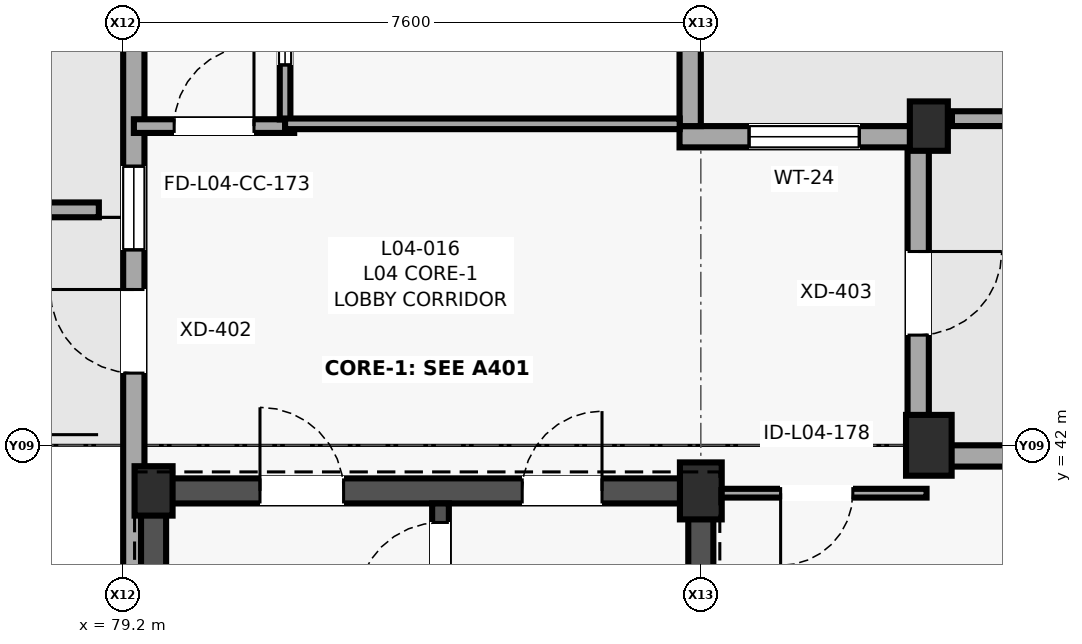
"""IFC4 building model, lengths in metres.
Left out: names, types, materials, properties, quantities, classifications, styles, units other than length and angle.
Written with IfcOpenShell. Run it as: python <this file> out.ifc"""

import sys

from ifc_helpers import new_model, si_unit, direction, frame, frame_2d, origin, origin_2d, place, context, subcontext, project, spatial, polyline, rectangle, outline, extrude, element, fill, save


model = new_model("IFC4")
c1 = context("Model", 3, precision=1e-05, world=origin(), true_north=direction((0.0, 1.0)))
c2 = subcontext(c1, "Body", "Model", "MODEL_VIEW")
j1 = project(units=[si_unit("LENGTHUNIT", "METRE"), si_unit("PLANEANGLEUNIT", "RADIAN")], contexts=[c1])
p1 = place(None, origin())
s1 = spatial("IfcSite", under=j1, at=p1, CompositionType="ELEMENT")
p2 = place(p1, origin())
s2 = spatial("IfcBuilding", under=s1, at=p2, CompositionType="ELEMENT")
p3 = place(p2, frame((0.0, 0.0, 16.2)))
s3 = spatial("IfcBuildingStorey", under=s2, at=p3, CompositionType="ELEMENT", Elevation=16.2)
p4 = place(p3, frame((79.6, 41.4, 0.0), z_axis=(0.0, 0.0, 1.0), x_axis=(1.0, 0.0, 0.0)))
e1 = element("IfcColumn", 1, at=p4, inside=s3, PredefinedType="COLUMN", context=c2, shape_type="SweptSolid", body=[
    extrude(rectangle(XDim=0.5, YDim=0.65, at=origin_2d()), origin(), (0.0, 0.0, 1.0), 4.0),
])
p5 = place(p3, frame((86.8, 41.4, 0.0), z_axis=(0.0, 0.0, 1.0), x_axis=(1.0, 0.0, 0.0)))
e2 = element("IfcColumn", 2, at=p5, inside=s3, PredefinedType="COLUMN", context=c2, shape_type="SweptSolid", body=[
    extrude(rectangle(XDim=0.55, YDim=0.75, at=origin_2d()), origin(), (0.0, 0.0, 1.0), 4.0),
])
p6 = place(p3, frame((89.8, 42.0, 0.0), z_axis=(0.0, 0.0, 1.0), x_axis=(1.0, 0.0, 0.0)))
e3 = element("IfcColumn", 3, at=p6, inside=s3, PredefinedType="COLUMN", context=c2, shape_type="SweptSolid", body=[
    extrude(rectangle(XDim=0.6, YDim=0.8, at=origin_2d()), origin(), (0.0, 0.0, 1.0), 4.0),
])
p7 = place(p3, frame((89.8, 46.2, 0.0), z_axis=(0.0, 0.0, 1.0), x_axis=(1.0, 0.0, 0.0)))
e4 = element("IfcColumn", 4, at=p7, inside=s3, PredefinedType="COLUMN", context=c2, shape_type="SweptSolid", body=[
    extrude(rectangle(XDim=0.5, YDim=0.65, at=origin_2d()), origin(), (0.0, 0.0, 1.0), 4.0),
])
p8 = place(p3, frame((94.0, 41.86, 0.0), z_axis=(0.0, 0.0, 1.0), x_axis=(-1.0, 0.0, 0.0)))
e5 = element("IfcWall", 5, at=p8, inside=s3, PredefinedType="SOLIDWALL", context=c2, shape_type="SweptSolid", body=[
    extrude(rectangle(XDim=4.48, YDim=0.28, at=frame_2d((2.24, 0.0))), origin(), (0.0, 0.0, 1.0), 3.305),
])
p9 = place(p8, frame((1.265, 0.0, 1.05)))
e6 = element("IfcOpeningElement", 6, at=p9, cuts=e5, PredefinedType="OPENING", context=c2, shape_type="SweptSolid", body=[
    extrude(rectangle(XDim=1.95, YDim=1.5, at=frame_2d((0.975, 0.75))), frame((0.0, 0.15, 0.0), z_axis=(0.0, -1.0, 0.0), x_axis=(1.0, 0.0, 0.0)), (0.0, 0.0, 1.0), 0.3),
])
p10 = place(p3, frame((89.66, 42.0, 0.0), z_axis=(0.0, 0.0, 1.0), x_axis=(0.0, 1.0, 0.0)))
e7 = element("IfcWall", 7, at=p10, inside=s3, PredefinedType="SOLIDWALL", context=c2, shape_type="SweptSolid", body=[
    extrude(rectangle(XDim=3.92, YDim=0.28, at=frame_2d((1.96, 0.0))), origin(), (0.0, 0.0, 1.0), 3.275),
])
p11 = place(p10, frame((1.45, 0.0, 0.0)))
e8 = element("IfcOpeningElement", 8, at=p11, cuts=e7, PredefinedType="OPENING", context=c2, shape_type="SweptSolid", body=[
    extrude(rectangle(XDim=1.1, YDim=2.15, at=frame_2d((0.55, 1.075))), frame((0.0, 0.15, 0.0), z_axis=(0.0, -1.0, 0.0), x_axis=(1.0, 0.0, 0.0)), (0.0, 0.0, 1.0), 0.3),
])
p12 = place(p3, frame((89.8, 46.06, 0.0), z_axis=(0.0, 0.0, 1.0), x_axis=(-1.0, 0.0, 0.0)))
e9 = element("IfcWall", 9, at=p12, inside=s3, PredefinedType="SOLIDWALL", context=c2, shape_type="SweptSolid", body=[
    extrude(rectangle(XDim=3.28, YDim=0.28, at=frame_2d((1.64, 0.0))), origin(), (0.0, 0.0, 1.0), 3.78),
])
p13 = place(p12, frame((0.915, 0.0, 0.85)))
e10 = element("IfcOpeningElement", 10, at=p13, cuts=e9, PredefinedType="OPENING", context=c2, shape_type="SweptSolid", body=[
    extrude(rectangle(XDim=1.45, YDim=1.7, at=frame_2d((0.725, 0.85))), frame((0.0, 0.15, 0.0), z_axis=(0.0, -1.0, 0.0), x_axis=(1.0, 0.0, 0.0)), (0.0, 0.0, 1.0), 0.3),
])
p14 = place(p3, frame((86.66, 46.2, 0.0), z_axis=(0.0, 0.0, 1.0), x_axis=(0.0, 1.0, 0.0)))
e11 = element("IfcWall", 11, at=p14, inside=s3, PredefinedType="SOLIDWALL", context=c2, shape_type="SweptSolid", body=[
    extrude(rectangle(XDim=11.1, YDim=0.28, at=frame_2d((5.55, 0.0))), origin(), (0.0, 0.0, 1.0), 3.175),
])
p15 = place(p14, frame((1.0, 0.0, 0.85)))
e12 = element("IfcOpeningElement", 12, at=p15, cuts=e11, PredefinedType="OPENING", context=c2, shape_type="SweptSolid", body=[
    extrude(rectangle(XDim=1.7, YDim=1.75, at=frame_2d((0.85, 0.875))), frame((0.0, 0.15, 0.0), z_axis=(0.0, -1.0, 0.0), x_axis=(1.0, 0.0, 0.0)), (0.0, 0.0, 1.0), 0.3),
])
p16 = place(p14, frame((4.6, 0.0, 0.85)))
e13 = element("IfcOpeningElement", 13, at=p16, cuts=e11, PredefinedType="OPENING", context=c2, shape_type="SweptSolid", body=[
    extrude(rectangle(XDim=1.9, YDim=1.65, at=frame_2d((0.95, 0.825))), frame((0.0, 0.15, 0.0), z_axis=(0.0, -1.0, 0.0), x_axis=(1.0, 0.0, 0.0)), (0.0, 0.0, 1.0), 0.3),
])
p17 = place(p14, frame((7.775, 0.0, 1.05)))
e14 = element("IfcOpeningElement", 14, at=p17, cuts=e11, PredefinedType="OPENING", context=c2, shape_type="SweptSolid", body=[
    extrude(rectangle(XDim=2.05, YDim=1.55, at=frame_2d((1.025, 0.775))), frame((0.0, 0.15, 0.0), z_axis=(0.0, -1.0, 0.0), x_axis=(1.0, 0.0, 0.0)), (0.0, 0.0, 1.0), 0.3),
])
p18 = place(p3, frame((79.34, 50.84, 0.0), z_axis=(0.0, 0.0, 1.0), x_axis=(0.0, -1.0, 0.0)))
e15 = element("IfcWall", 15, at=p18, inside=s3, PredefinedType="SOLIDWALL", context=c2, shape_type="SweptSolid", body=[
    extrude(rectangle(XDim=17.56, YDim=0.28, at=frame_2d((8.78, 0.0))), origin(), (0.0, 0.0, 1.0), 3.175),
])
p19 = place(p18, frame((6.79, 0.0, 0.0)))
e16 = element("IfcOpeningElement", 16, at=p19, cuts=e15, PredefinedType="OPENING", context=c2, shape_type="SweptSolid", body=[
    extrude(rectangle(XDim=1.1, YDim=2.15, at=frame_2d((0.55, 1.075))), frame((0.0, 0.15, 0.0), z_axis=(0.0, -1.0, 0.0), x_axis=(1.0, 0.0, 0.0)), (0.0, 0.0, 1.0), 0.3),
])
p20 = place(p18, frame((1.881, 0.0, 0.85)))
e17 = element("IfcOpeningElement", 17, at=p20, cuts=e15, PredefinedType="OPENING", context=c2, shape_type="SweptSolid", body=[
    extrude(rectangle(XDim=1.45, YDim=1.7, at=frame_2d((0.725, 0.85))), frame((0.0, 0.15, 0.0), z_axis=(0.0, -1.0, 0.0), x_axis=(1.0, 0.0, 0.0)), (0.0, 0.0, 1.0), 0.3),
])
p21 = place(p18, frame((5.168, 0.0, 0.75)))
e18 = element("IfcOpeningElement", 18, at=p21, cuts=e15, PredefinedType="OPENING", context=c2, shape_type="SweptSolid", body=[
    extrude(rectangle(XDim=1.1, YDim=2.1, at=frame_2d((0.55, 1.05))), frame((0.0, 0.15, 0.0), z_axis=(0.0, -1.0, 0.0), x_axis=(1.0, 0.0, 0.0)), (0.0, 0.0, 1.0), 0.3),
])
p22 = place(p3, frame((51.12, 45.098, 0.0), z_axis=(0.0, 0.0, 1.0), x_axis=(1.0, 0.0, 0.0)))
e19 = element("IfcWall", 19, at=p22, inside=s3, PredefinedType="PARAPET", context=c2, shape_type="SweptSolid", body=[
    extrude(outline(polyline([(0.0, 0.0), (27.76, 0.0), (27.76, 1.12), (18.877, 1.12), (18.827, 1.46), (8.933, 1.46), (8.883, 1.12), (0.0, 1.12), (0.0, 0.0)])), frame((0.0, 0.098, 0.0), z_axis=(0.0, -1.0, 0.0), x_axis=(1.0, 0.0, 0.0)), (0.0, 0.0, 1.0), 0.195),
])
p23 = place(p3, frame((90.104, 46.298, 0.0), z_axis=(0.0, 0.0, 1.0), x_axis=(1.0, 0.0, 0.0)))
e20 = element("IfcWall", 20, at=p23, inside=s3, PredefinedType="PARAPET", context=c2, shape_type="SweptSolid", body=[
    extrude(outline(polyline([(0.0, 0.0), (17.176, 0.0), (17.176, 1.12), (11.68, 1.12), (11.63, 1.46), (5.546, 1.46), (5.496, 1.12), (0.0, 1.12), (0.0, 0.0)])), frame((0.0, 0.098, 0.0), z_axis=(0.0, -1.0, 0.0), x_axis=(1.0, 0.0, 0.0)), (0.0, 0.0, 1.0), 0.195),
])
p24 = place(p3, frame((79.435, 41.4, 0.0), z_axis=(0.0, 0.0, 1.0), x_axis=(1.0, 0.0, 0.0)))
e21 = element("IfcWall", 21, at=p24, inside=s3, PredefinedType="SHEAR", context=c2, shape_type="SweptSolid", body=[
    extrude(rectangle(XDim=7.53, YDim=0.33, at=frame_2d((3.765, 0.0))), origin(), (0.0, 0.0, 1.0), 3.78),
])
p25 = place(p24, frame((5.015, 0.0, 0.0)))
e22 = element("IfcOpeningElement", 22, at=p25, cuts=e21, PredefinedType="OPENING", context=c2, shape_type="SweptSolid", body=[
    extrude(rectangle(XDim=1.05, YDim=2.15, at=frame_2d((0.525, 1.075))), frame((0.0, 0.175, 0.0), z_axis=(0.0, -1.0, 0.0), x_axis=(1.0, 0.0, 0.0)), (0.0, 0.0, 1.0), 0.35),
])
p26 = place(p24, frame((1.565, 0.0, 0.0)))
e23 = element("IfcOpeningElement", 23, at=p26, cuts=e21, PredefinedType="OPENING", context=c2, shape_type="SweptSolid", body=[
    extrude(rectangle(XDim=1.1, YDim=2.15, at=frame_2d((0.55, 1.075))), frame((0.0, 0.175, 0.0), z_axis=(0.0, -1.0, 0.0), x_axis=(1.0, 0.0, 0.0)), (0.0, 0.0, 1.0), 0.35),
])
for number, where, z_axis, x_axis in (
    (24, (79.6, 33.765, 0.0), (0.0, 0.0, 1.0), (0.0, 1.0, 0.0)),
    (25, (86.8, 33.765, 0.0), (0.0, 0.0, 1.0), (0.0, 1.0, 0.0)),
):
    element("IfcWall", number, at=place(p3, frame(where, z_axis=z_axis, x_axis=x_axis)), inside=s3, PredefinedType="SHEAR", context=c2, shape_type="SweptSolid", body=[
        extrude(rectangle(XDim=7.47, YDim=0.33, at=frame_2d((3.735, 0.0))), origin(), (0.0, 0.0, 1.0), 3.78),
    ])
p27 = place(p3, frame((83.375, 33.765, 0.0), z_axis=(0.0, 0.0, 1.0), x_axis=(0.0, 1.0, 0.0)))
e26 = element("IfcWall", 26, at=p27, inside=s3, PredefinedType="SHEAR", context=c2, shape_type="SweptSolid", body=[
    extrude(rectangle(XDim=7.47, YDim=0.22, at=frame_2d((3.735, 0.0))), origin(), (0.0, 0.0, 1.0), 3.78),
])
p28 = place(p27, frame((6.12, 0.0, 0.0)))
e27 = element("IfcOpeningElement", 27, at=p28, cuts=e26, PredefinedType="OPENING", context=c2, shape_type="SweptSolid", body=[
    extrude(rectangle(XDim=1.1, YDim=2.15, at=frame_2d((0.55, 1.075))), frame((0.0, 0.12, 0.0), z_axis=(0.0, -1.0, 0.0), x_axis=(1.0, 0.0, 0.0)), (0.0, 0.0, 1.0), 0.24),
])
p29 = place(p3, frame((79.341, 46.2, 0.0), z_axis=(0.0, 0.0, 1.0), x_axis=(1.0, 0.0, 0.0)))
e28 = element("IfcWall", 28, at=p29, inside=s3, PredefinedType="PARTITIONING", context=c2, shape_type="SweptSolid", body=[
    extrude(rectangle(XDim=2.109, YDim=0.18, at=frame_2d((1.054, 0.0))), origin(), (0.0, 0.0, 1.0), 3.78),
])
p30 = place(p29, frame((0.53, 0.0, 0.0)))
e29 = element("IfcOpeningElement", 29, at=p30, cuts=e28, PredefinedType="OPENING", context=c2, shape_type="SweptSolid", body=[
    extrude(rectangle(XDim=1.05, YDim=2.15, at=frame_2d((0.525, 1.075))), frame((0.0, 0.1, 0.0), z_axis=(0.0, -1.0, 0.0), x_axis=(1.0, 0.0, 0.0)), (0.0, 0.0, 1.0), 0.2),
])
p31 = place(p3, frame((89.77, 41.37, 0.0), z_axis=(0.0, 0.0, 1.0), x_axis=(-1.0, 0.0, 0.0)))
e30 = element("IfcWall", 30, at=p31, inside=s3, PredefinedType="PARTITIONING", context=c2, shape_type="SweptSolid", body=[
    extrude(rectangle(XDim=2.89, YDim=0.115, at=frame_2d((1.445, 0.0))), origin(), (0.0, 0.0, 1.0), 3.755),
])
p32 = place(p31, frame((0.97, 0.0, 0.0)))
e31 = element("IfcOpeningElement", 31, at=p32, cuts=e30, PredefinedType="OPENING", context=c2, shape_type="SweptSolid", body=[
    extrude(rectangle(XDim=0.95, YDim=2.05, at=frame_2d((0.475, 1.025))), frame((0.0, 0.067, 0.0), z_axis=(0.0, -1.0, 0.0), x_axis=(1.0, 0.0, 0.0)), (0.0, 0.0, 1.0), 0.135),
])
p33 = place(p3, frame((81.33, 53.502, 0.0), z_axis=(0.0, 0.0, 1.0), x_axis=(0.0, -1.0, 0.0)))
e32 = element("IfcWall", 32, at=p33, inside=s3, PredefinedType="PARTITIONING", context=c2, shape_type="SweptSolid", body=[
    extrude(rectangle(XDim=7.214, YDim=0.14, at=frame_2d((3.607, 0.0))), origin(), (0.0, 0.0, 1.0), 3.775),
])
p34 = place(p33, frame((3.017, 0.0, 0.0)))
e33 = element("IfcOpeningElement", 33, at=p34, cuts=e32, PredefinedType="OPENING", context=c2, shape_type="SweptSolid", body=[
    extrude(rectangle(XDim=1.18, YDim=2.2, at=frame_2d((0.59, 1.1))), frame((0.0, 0.08, 0.0), z_axis=(0.0, -1.0, 0.0), x_axis=(1.0, 0.0, 0.0)), (0.0, 0.0, 1.0), 0.16),
])
p35 = place(p33, frame((4.897, 0.0, 1.05)))
e34 = element("IfcOpeningElement", 34, at=p35, cuts=e32, PredefinedType="OPENING", context=c2, shape_type="SweptSolid", body=[
    extrude(rectangle(XDim=1.6, YDim=1.1, at=frame_2d((0.8, 0.55))), frame((0.0, 0.08, 0.0), z_axis=(0.0, -1.0, 0.0), x_axis=(1.0, 0.0, 0.0)), (0.0, 0.0, 1.0), 0.16),
])
p36 = place(p3, frame((81.33, 46.23, 0.0), z_axis=(0.0, 0.0, 1.0), x_axis=(1.0, 0.0, 0.0)))
e35 = element("IfcWall", 35, at=p36, inside=s3, PredefinedType="PARTITIONING", context=c2, shape_type="SweptSolid", body=[
    extrude(rectangle(XDim=5.192, YDim=0.14, at=frame_2d((2.596, 0.0))), origin(), (0.0, 0.0, 1.0), 3.775),
])
p37 = place(p19, frame((1.1, 0.0, 0.0), z_axis=(0.0, 0.0, 1.0), x_axis=(-1.0, 0.0, 0.0)))
e36 = element("IfcDoor", 36, at=p37, inside=s3, OperationType="SINGLE_SWING_LEFT", PredefinedType="DOOR", context=c2, shape_type="SweptSolid", body=[
    extrude(rectangle(XDim=1.1, YDim=2.15, at=frame_2d((0.55, 1.075))), frame((0.0, 0.025, 0.0), z_axis=(0.0, -1.0, 0.0), x_axis=(1.0, 0.0, 0.0)), (0.0, 0.0, 1.0), 0.05),
])
fill(e16, e36)
p38 = place(p11, frame((1.1, 0.0, 0.0), z_axis=(0.0, 0.0, 1.0), x_axis=(-1.0, 0.0, 0.0)))
e37 = element("IfcDoor", 37, at=p38, inside=s3, OperationType="SINGLE_SWING_RIGHT", PredefinedType="DOOR", context=c2, shape_type="SweptSolid", body=[
    extrude(rectangle(XDim=1.1, YDim=2.15, at=frame_2d((0.55, 1.075))), frame((0.0, 0.025, 0.0), z_axis=(0.0, -1.0, 0.0), x_axis=(1.0, 0.0, 0.0)), (0.0, 0.0, 1.0), 0.05),
])
fill(e8, e37)
p39 = place(p13, origin())
e38 = element("IfcWindow", 38, at=p39, inside=s3, PartitioningType="SINGLE_PANEL", PredefinedType="WINDOW", context=c2, shape_type="SweptSolid", body=[
    extrude(rectangle(XDim=1.45, YDim=1.7, at=frame_2d((0.725, 0.85))), frame((0.0, 0.03, 0.0), z_axis=(0.0, -1.0, 0.0), x_axis=(1.0, 0.0, 0.0)), (0.0, 0.0, 1.0), 0.06),
])
fill(e10, e38)
p40 = place(p21, origin())
e39 = element("IfcWindow", 39, at=p40, inside=s3, PartitioningType="SINGLE_PANEL", PredefinedType="WINDOW", context=c2, shape_type="SweptSolid", body=[
    extrude(rectangle(XDim=1.1, YDim=2.1, at=frame_2d((0.55, 1.05))), frame((0.0, 0.03, 0.0), z_axis=(0.0, -1.0, 0.0), x_axis=(1.0, 0.0, 0.0)), (0.0, 0.0, 1.0), 0.06),
])
fill(e18, e39)
p41 = place(p28, origin())
e40 = element("IfcDoor", 40, at=p41, inside=s3, OperationType="SINGLE_SWING_LEFT", PredefinedType="DOOR", context=c2, shape_type="SweptSolid", body=[
    extrude(rectangle(XDim=1.1, YDim=2.15, at=frame_2d((0.55, 1.075))), frame((0.0, 0.025, 0.0), z_axis=(0.0, -1.0, 0.0), x_axis=(1.0, 0.0, 0.0)), (0.0, 0.0, 1.0), 0.05),
])
fill(e27, e40)
p42 = place(p25, origin())
e41 = element("IfcDoor", 41, at=p42, inside=s3, OperationType="SINGLE_SWING_RIGHT", PredefinedType="DOOR", context=c2, shape_type="SweptSolid", body=[
    extrude(rectangle(XDim=1.05, YDim=2.15, at=frame_2d((0.525, 1.075))), frame((0.0, 0.025, 0.0), z_axis=(0.0, -1.0, 0.0), x_axis=(1.0, 0.0, 0.0)), (0.0, 0.0, 1.0), 0.05),
])
fill(e22, e41)
p43 = place(p26, origin())
e42 = element("IfcDoor", 42, at=p43, inside=s3, OperationType="SINGLE_SWING_LEFT", PredefinedType="DOOR", context=c2, shape_type="SweptSolid", body=[
    extrude(rectangle(XDim=1.1, YDim=2.15, at=frame_2d((0.55, 1.075))), frame((0.0, 0.025, 0.0), z_axis=(0.0, -1.0, 0.0), x_axis=(1.0, 0.0, 0.0)), (0.0, 0.0, 1.0), 0.05),
])
fill(e23, e42)
p44 = place(p30, origin())
e43 = element("IfcDoor", 43, at=p44, inside=s3, OperationType="SINGLE_SWING_RIGHT", PredefinedType="DOOR", context=c2, shape_type="SweptSolid", body=[
    extrude(rectangle(XDim=1.05, YDim=2.15, at=frame_2d((0.525, 1.075))), frame((0.0, 0.025, 0.0), z_axis=(0.0, -1.0, 0.0), x_axis=(1.0, 0.0, 0.0)), (0.0, 0.0, 1.0), 0.05),
])
fill(e29, e43)
p45 = place(p32, origin())
e44 = element("IfcDoor", 44, at=p45, inside=s3, OperationType="SINGLE_SWING_RIGHT", PredefinedType="DOOR", context=c2, shape_type="SweptSolid", body=[
    extrude(rectangle(XDim=0.95, YDim=2.05, at=frame_2d((0.475, 1.025))), frame((0.0, 0.025, 0.0), z_axis=(0.0, -1.0, 0.0), x_axis=(1.0, 0.0, 0.0)), (0.0, 0.0, 1.0), 0.05),
])
fill(e31, e44)
p46 = place(p35, origin())
e45 = element("IfcWindow", 45, at=p46, inside=s3, PartitioningType="SINGLE_PANEL", PredefinedType="WINDOW", context=c2, shape_type="SweptSolid", body=[
    extrude(rectangle(XDim=1.6, YDim=1.1, at=frame_2d((0.8, 0.55))), frame((0.0, 0.03, 0.0), z_axis=(0.0, -1.0, 0.0), x_axis=(1.0, 0.0, 0.0)), (0.0, 0.0, 1.0), 0.06),
])
fill(e34, e45)
save(model, sys.argv[1])
